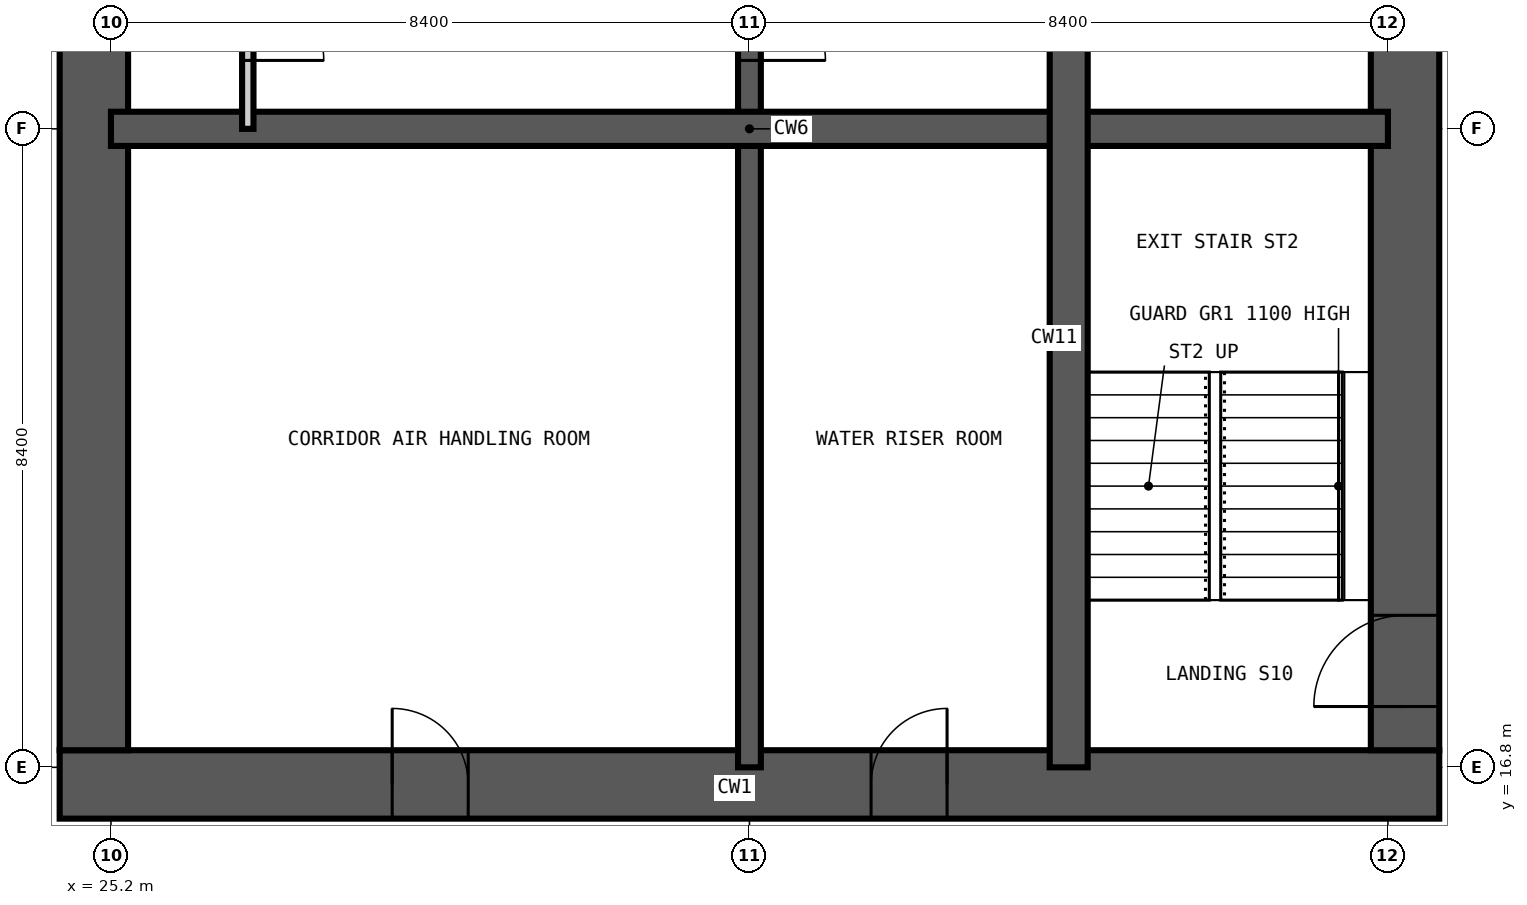
"""IFC4 building model, lengths in metres.
Left out: names, types, materials, properties, quantities, classifications, styles, units other than length and angle.
Written with IfcOpenShell. Run it as: python <this file> out.ifc"""

import sys

from ifc_helpers import new_model, si_unit, direction, frame, frame_2d, origin, place, context, subcontext, project, spatial, rectangle, extrude, element, fill, save


model = new_model("IFC4")
c1 = context("Model", 3, precision=1e-05, world=origin(), true_north=direction((0.0, 1.0)))
c2 = subcontext(c1, "Body", "Model", "MODEL_VIEW")
j1 = project(units=[si_unit("LENGTHUNIT", "METRE"), si_unit("PLANEANGLEUNIT", "RADIAN")], contexts=[c1])
p1 = place(None, origin())
s1 = spatial("IfcSite", under=j1, at=p1, CompositionType="ELEMENT")
p2 = place(p1, origin())
s2 = spatial("IfcBuilding", under=s1, at=p2, CompositionType="ELEMENT")
p3 = place(p2, frame((0.0, 0.0, 237.3)))
s3 = spatial("IfcBuildingStorey", under=s2, at=p3, CompositionType="ELEMENT", Elevation=237.3)
p4 = place(p3, frame((24.525, 16.575, -0.35), z_axis=(0.0, 0.0, 1.0), x_axis=(1.0, 0.0, 0.0)))
e1 = element("IfcWall", 1, at=p4, inside=s3, PredefinedType="SHEAR", context=c2, shape_type="SweptSolid", body=[
    extrude(rectangle(XDim=18.15, YDim=0.9, at=frame_2d((9.075, 0.0))), origin(), (0.0, 0.0, 1.0), 3.9),
])
p5 = place(p4, frame((4.375, 0.0, 0.35)))
e2 = element("IfcOpeningElement", 2, at=p5, cuts=e1, PredefinedType="OPENING", context=c2, shape_type="SweptSolid", body=[
    extrude(rectangle(XDim=1.0, YDim=2.1, at=frame_2d((0.5, 1.05))), frame((0.0, 0.46, 0.0), z_axis=(0.0, -1.0, 0.0), x_axis=(1.0, 0.0, 0.0)), (0.0, 0.0, 1.0), 0.92),
])
p6 = place(p4, frame((10.675, 0.0, 0.35)))
e3 = element("IfcOpeningElement", 3, at=p6, cuts=e1, PredefinedType="OPENING", context=c2, shape_type="SweptSolid", body=[
    extrude(rectangle(XDim=1.0, YDim=2.1, at=frame_2d((0.5, 1.05))), frame((0.0, 0.46, 0.0), z_axis=(0.0, -1.0, 0.0), x_axis=(1.0, 0.0, 0.0)), (0.0, 0.0, 1.0), 0.92),
])
p7 = place(p3, frame((42.225, 17.025, -0.35), z_axis=(0.0, 0.0, 1.0), x_axis=(0.0, 1.0, 0.0)))
e4 = element("IfcWall", 4, at=p7, inside=s3, PredefinedType="SHEAR", context=c2, shape_type="SweptSolid", body=[
    extrude(rectangle(XDim=24.75, YDim=0.9, at=frame_2d((12.375, 0.0))), origin(), (0.0, 0.0, 1.0), 3.9),
])
p8 = place(p7, frame((0.575, 0.0, 0.35)))
e5 = element("IfcOpeningElement", 5, at=p8, cuts=e4, PredefinedType="OPENING", context=c2, shape_type="SweptSolid", body=[
    extrude(rectangle(XDim=1.2, YDim=2.2, at=frame_2d((0.6, 1.1))), frame((0.0, 0.46, 0.0), z_axis=(0.0, -1.0, 0.0), x_axis=(1.0, 0.0, 0.0)), (0.0, 0.0, 1.0), 0.92),
])
p9 = place(p7, frame((11.475, 0.0, 0.35)))
e6 = element("IfcOpeningElement", 6, at=p9, cuts=e4, PredefinedType="OPENING", context=c2, shape_type="SweptSolid", body=[
    extrude(rectangle(XDim=1.8, YDim=2.2, at=frame_2d((0.9, 1.1))), frame((0.0, 0.46, 0.0), z_axis=(0.0, -1.0, 0.0), x_axis=(1.0, 0.0, 0.0)), (0.0, 0.0, 1.0), 0.92),
])
p10 = place(p7, frame((20.275, 0.0, 0.35)))
e7 = element("IfcOpeningElement", 7, at=p10, cuts=e4, PredefinedType="OPENING", context=c2, shape_type="SweptSolid", body=[
    extrude(rectangle(XDim=1.0, YDim=2.1, at=frame_2d((0.5, 1.05))), frame((0.0, 0.46, 0.0), z_axis=(0.0, -1.0, 0.0), x_axis=(1.0, 0.0, 0.0)), (0.0, 0.0, 1.0), 0.92),
])
p11 = place(p3, frame((24.975, 41.775, -0.35), z_axis=(0.0, 0.0, 1.0), x_axis=(0.0, -1.0, 0.0)))
e8 = element("IfcWall", 8, at=p11, inside=s3, PredefinedType="SHEAR", context=c2, shape_type="SweptSolid", body=[
    extrude(rectangle(XDim=24.75, YDim=0.9, at=frame_2d((12.375, 0.0))), origin(), (0.0, 0.0, 1.0), 3.9),
])
p12 = place(p11, frame((11.875, 0.0, 0.35)))
e9 = element("IfcOpeningElement", 9, at=p12, cuts=e8, PredefinedType="OPENING", context=c2, shape_type="SweptSolid", body=[
    extrude(rectangle(XDim=1.0, YDim=2.1, at=frame_2d((0.5, 1.05))), frame((0.0, 0.46, 0.0), z_axis=(0.0, -1.0, 0.0), x_axis=(1.0, 0.0, 0.0)), (0.0, 0.0, 1.0), 0.92),
])
p13 = place(p3, frame((33.6, 16.8, -0.35), z_axis=(0.0, 0.0, 1.0), x_axis=(0.0, 1.0, 0.0)))
e10 = element("IfcWall", 10, at=p13, inside=s3, PredefinedType="SHEAR", context=c2, shape_type="SweptSolid", body=[
    extrude(rectangle(XDim=25.2, YDim=0.3, at=frame_2d((12.6, 0.0))), origin(), (0.0, 0.0, 1.0), 3.9),
])
p14 = place(p13, frame((22.5, 0.0, 0.35)))
e11 = element("IfcOpeningElement", 11, at=p14, cuts=e10, PredefinedType="OPENING", context=c2, shape_type="SweptSolid", body=[
    extrude(rectangle(XDim=1.2, YDim=2.2, at=frame_2d((0.6, 1.1))), frame((0.0, 0.16, 0.0), z_axis=(0.0, -1.0, 0.0), x_axis=(1.0, 0.0, 0.0)), (0.0, 0.0, 1.0), 0.32),
])
p15 = place(p13, frame((18.3, 0.0, 0.35)))
e12 = element("IfcOpeningElement", 12, at=p15, cuts=e10, PredefinedType="OPENING", context=c2, shape_type="SweptSolid", body=[
    extrude(rectangle(XDim=1.2, YDim=2.2, at=frame_2d((0.6, 1.1))), frame((0.0, 0.16, 0.0), z_axis=(0.0, -1.0, 0.0), x_axis=(1.0, 0.0, 0.0)), (0.0, 0.0, 1.0), 0.32),
])
p16 = place(p13, frame((9.3, 0.0, 0.35)))
e13 = element("IfcOpeningElement", 13, at=p16, cuts=e10, PredefinedType="OPENING", context=c2, shape_type="SweptSolid", body=[
    extrude(rectangle(XDim=1.0, YDim=2.1, at=frame_2d((0.5, 1.05))), frame((0.0, 0.16, 0.0), z_axis=(0.0, -1.0, 0.0), x_axis=(1.0, 0.0, 0.0)), (0.0, 0.0, 1.0), 0.32),
])
p17 = place(p3, frame((25.2, 25.2, -0.35), z_axis=(0.0, 0.0, 1.0), x_axis=(1.0, 0.0, 0.0)))
e14 = element("IfcWall", 14, at=p17, inside=s3, PredefinedType="SHEAR", context=c2, shape_type="SweptSolid", body=[
    extrude(rectangle(XDim=16.8, YDim=0.45, at=frame_2d((8.4, 0.0))), origin(), (0.0, 0.0, 1.0), 3.9),
])
p18 = place(p3, frame((37.8, 16.8, -0.35), z_axis=(0.0, 0.0, 1.0), x_axis=(0.0, 1.0, 0.0)))
e15 = element("IfcWall", 15, at=p18, inside=s3, PredefinedType="SHEAR", context=c2, shape_type="SweptSolid", body=[
    extrude(rectangle(XDim=11.2, YDim=0.5, at=frame_2d((5.6, 0.0))), origin(), (0.0, 0.0, 1.0), 3.9),
])
p19 = place(p3, frame((27.0, 25.2, 0.0), z_axis=(0.0, 0.0, 1.0), x_axis=(0.0, 1.0, 0.0)))
e16 = element("IfcWall", 16, at=p19, inside=s3, PredefinedType="PARTITIONING", context=c2, shape_type="SweptSolid", body=[
    extrude(rectangle(XDim=8.4, YDim=0.15, at=frame_2d((4.2, 0.0))), origin(), (0.0, 0.0, 1.0), 3.55),
])
p20 = place(p19, frame((0.9, 0.0, 0.0)))
e17 = element("IfcOpeningElement", 17, at=p20, cuts=e16, PredefinedType="OPENING", context=c2, shape_type="SweptSolid", body=[
    extrude(rectangle(XDim=1.0, YDim=2.1, at=frame_2d((0.5, 1.05))), frame((0.0, 0.085, 0.0), z_axis=(0.0, -1.0, 0.0), x_axis=(1.0, 0.0, 0.0)), (0.0, 0.0, 1.0), 0.17),
])
p21 = place(p19, frame((3.7, 0.0, 0.0)))
e18 = element("IfcOpeningElement", 18, at=p21, cuts=e16, PredefinedType="OPENING", context=c2, shape_type="SweptSolid", body=[
    extrude(rectangle(XDim=1.0, YDim=2.1, at=frame_2d((0.5, 1.05))), frame((0.0, 0.085, 0.0), z_axis=(0.0, -1.0, 0.0), x_axis=(1.0, 0.0, 0.0)), (0.0, 0.0, 1.0), 0.17),
])
p22 = place(p19, frame((6.5, 0.0, 0.0)))
e19 = element("IfcOpeningElement", 19, at=p22, cuts=e16, PredefinedType="OPENING", context=c2, shape_type="SweptSolid", body=[
    extrude(rectangle(XDim=1.0, YDim=2.1, at=frame_2d((0.5, 1.05))), frame((0.0, 0.085, 0.0), z_axis=(0.0, -1.0, 0.0), x_axis=(1.0, 0.0, 0.0)), (0.0, 0.0, 1.0), 0.17),
])
p23 = place(p8, origin())
e20 = element("IfcDoor", 20, at=p23, inside=s3, OperationType="SINGLE_SWING_LEFT", PredefinedType="DOOR", context=c2, shape_type="SweptSolid", body=[
    extrude(rectangle(XDim=1.2, YDim=2.2, at=frame_2d((0.6, 1.1))), frame((0.0, 0.025, 0.0), z_axis=(0.0, -1.0, 0.0), x_axis=(1.0, 0.0, 0.0)), (0.0, 0.0, 1.0), 0.05),
])
fill(e5, e20)
p24 = place(p20, frame((1.0, 0.0, 0.0), z_axis=(0.0, 0.0, 1.0), x_axis=(-1.0, 0.0, 0.0)))
e21 = element("IfcDoor", 21, at=p24, inside=s3, OperationType="SINGLE_SWING_RIGHT", PredefinedType="DOOR", context=c2, shape_type="SweptSolid", body=[
    extrude(rectangle(XDim=1.0, YDim=2.1, at=frame_2d((0.5, 1.05))), frame((0.0, 0.025, 0.0), z_axis=(0.0, -1.0, 0.0), x_axis=(1.0, 0.0, 0.0)), (0.0, 0.0, 1.0), 0.05),
])
fill(e17, e21)
p25 = place(p16, frame((1.0, 0.0, 0.0), z_axis=(0.0, 0.0, 1.0), x_axis=(-1.0, 0.0, 0.0)))
e22 = element("IfcDoor", 22, at=p25, inside=s3, OperationType="SINGLE_SWING_RIGHT", PredefinedType="DOOR", context=c2, shape_type="SweptSolid", body=[
    extrude(rectangle(XDim=1.0, YDim=2.1, at=frame_2d((0.5, 1.05))), frame((0.0, 0.025, 0.0), z_axis=(0.0, -1.0, 0.0), x_axis=(1.0, 0.0, 0.0)), (0.0, 0.0, 1.0), 0.05),
])
fill(e13, e22)
p26 = place(p5, origin())
e23 = element("IfcDoor", 23, at=p26, inside=s3, OperationType="SINGLE_SWING_LEFT", PredefinedType="DOOR", context=c2, shape_type="SweptSolid", body=[
    extrude(rectangle(XDim=1.0, YDim=2.1, at=frame_2d((0.5, 1.05))), frame((0.0, 0.025, 0.0), z_axis=(0.0, -1.0, 0.0), x_axis=(1.0, 0.0, 0.0)), (0.0, 0.0, 1.0), 0.05),
])
fill(e2, e23)
p27 = place(p6, origin())
e24 = element("IfcDoor", 24, at=p27, inside=s3, OperationType="SINGLE_SWING_RIGHT", PredefinedType="DOOR", context=c2, shape_type="SweptSolid", body=[
    extrude(rectangle(XDim=1.0, YDim=2.1, at=frame_2d((0.5, 1.05))), frame((0.0, 0.025, 0.0), z_axis=(0.0, -1.0, 0.0), x_axis=(1.0, 0.0, 0.0)), (0.0, 0.0, 1.0), 0.05),
])
fill(e3, e24)
save(model, sys.argv[1])
